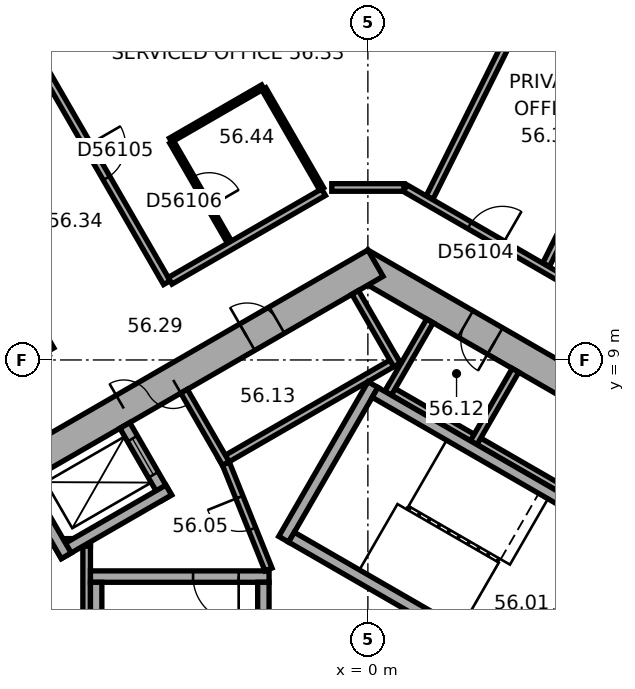
"""IFC4 building model, lengths in metres.
Left out: names, types, materials, properties, quantities, classifications, styles, units other than length and angle.
Written with IfcOpenShell. Run it as: python <this file> out.ifc"""

import sys

from ifc_helpers import new_model, si_unit, direction, frame, frame_2d, origin, place, context, subcontext, project, spatial, rectangle, extrude, element, fill, save


model = new_model("IFC4")
c1 = context("Model", 3, precision=1e-05, world=origin(), true_north=direction((0.0, 1.0)))
c2 = subcontext(c1, "Body", "Model", "MODEL_VIEW")
j1 = project(units=[si_unit("LENGTHUNIT", "METRE"), si_unit("PLANEANGLEUNIT", "RADIAN")], contexts=[c1])
p1 = place(None, origin())
s1 = spatial("IfcSite", under=j1, at=p1, CompositionType="ELEMENT")
p2 = place(p1, origin())
s2 = spatial("IfcBuilding", under=s1, at=p2, CompositionType="ELEMENT")
p3 = place(p2, frame((0.0, 0.0, 229.1)))
s3 = spatial("IfcBuildingStorey", under=s2, at=p3, CompositionType="ELEMENT", Elevation=229.1)
p4 = place(p3, frame((10.1, 5.6, 0.0), z_axis=(0.0, 0.0, 1.0), x_axis=(-0.866023897231, 0.500002609418, 0.0)))
e1 = element("IfcWall", 1, at=p4, inside=s3, PredefinedType="SHEAR", context=c2, shape_type="SweptSolid", body=[
    extrude(rectangle(XDim=11.894, YDim=0.8, at=frame_2d((5.947, 0.0))), origin(), (0.0, 0.0, 1.0), 3.7),
])
p5 = place(p4, frame((3.897, 0.0, 0.0)))
e2 = element("IfcOpeningElement", 2, at=p5, cuts=e1, PredefinedType="OPENING", context=c2, shape_type="SweptSolid", body=[
    extrude(rectangle(XDim=0.9, YDim=2.1, at=frame_2d((0.45, 1.05))), frame((0.0, 0.41, 0.0), z_axis=(0.0, -1.0, 0.0), x_axis=(1.0, 0.0, 0.0)), (0.0, 0.0, 1.0), 0.82),
])
p6 = place(p4, frame((7.797, 0.0, 0.0)))
e3 = element("IfcOpeningElement", 3, at=p6, cuts=e1, PredefinedType="OPENING", context=c2, shape_type="SweptSolid", body=[
    extrude(rectangle(XDim=0.9, YDim=2.1, at=frame_2d((0.45, 1.05))), frame((0.0, 0.41, 0.0), z_axis=(0.0, -1.0, 0.0), x_axis=(1.0, 0.0, 0.0)), (0.0, 0.0, 1.0), 0.82),
])
p7 = place(p3, frame((0.2, 11.547, 0.0), z_axis=(0.0, 0.0, 1.0), x_axis=(-0.866023897231, -0.500002609418, 0.0)))
e4 = element("IfcWall", 4, at=p7, inside=s3, PredefinedType="SHEAR", context=c2, shape_type="SweptSolid", body=[
    extrude(rectangle(XDim=11.894, YDim=0.8, at=frame_2d((5.947, 0.0))), origin(), (0.0, 0.0, 1.0), 3.7),
])
p8 = place(p7, frame((6.147, 0.0, 0.0)))
e5 = element("IfcOpeningElement", 5, at=p8, cuts=e4, PredefinedType="OPENING", context=c2, shape_type="SweptSolid", body=[
    extrude(rectangle(XDim=1.5, YDim=2.1, at=frame_2d((0.75, 1.05))), frame((0.0, 0.41, 0.0), z_axis=(0.0, -1.0, 0.0), x_axis=(1.0, 0.0, 0.0)), (0.0, 0.0, 1.0), 0.82),
])
p9 = place(p7, frame((2.997, 0.0, 0.0)))
e6 = element("IfcOpeningElement", 6, at=p9, cuts=e4, PredefinedType="OPENING", context=c2, shape_type="SweptSolid", body=[
    extrude(rectangle(XDim=0.9, YDim=2.1, at=frame_2d((0.45, 1.05))), frame((0.0, 0.41, 0.0), z_axis=(0.0, -1.0, 0.0), x_axis=(1.0, 0.0, 0.0)), (0.0, 0.0, 1.0), 0.82),
])
p10 = place(p3, frame((18.299, 13.727, 0.0), z_axis=(0.0, 0.0, 1.0), x_axis=(-0.894934554817, 0.44619742558, 0.0)))
e7 = element("IfcWall", 7, at=p10, inside=s3, PredefinedType="STANDARD", context=c2, shape_type="SweptSolid", body=[
    extrude(rectangle(XDim=18.841, YDim=0.2, at=frame_2d((9.421, 0.0))), origin(), (0.0, 0.0, 1.0), 3.7),
])
p11 = place(p10, frame((1.253, 0.0, 0.9)))
e8 = element("IfcOpeningElement", 8, at=p11, cuts=e7, PredefinedType="OPENING", context=c2, shape_type="SweptSolid", body=[
    extrude(rectangle(XDim=2.2, YDim=2.0, at=frame_2d((1.1, 1.0))), frame((0.0, 0.11, 0.0), z_axis=(0.0, -1.0, 0.0), x_axis=(1.0, 0.0, 0.0)), (0.0, 0.0, 1.0), 0.22),
])
p12 = place(p10, frame((4.786, 0.0, 0.9)))
e9 = element("IfcOpeningElement", 9, at=p12, cuts=e7, PredefinedType="OPENING", context=c2, shape_type="SweptSolid", body=[
    extrude(rectangle(XDim=2.2, YDim=2.0, at=frame_2d((1.1, 1.0))), frame((0.0, 0.11, 0.0), z_axis=(0.0, -1.0, 0.0), x_axis=(1.0, 0.0, 0.0)), (0.0, 0.0, 1.0), 0.22),
])
p13 = place(p10, frame((8.32, 0.0, 0.9)))
e10 = element("IfcOpeningElement", 10, at=p13, cuts=e7, PredefinedType="OPENING", context=c2, shape_type="SweptSolid", body=[
    extrude(rectangle(XDim=2.2, YDim=2.0, at=frame_2d((1.1, 1.0))), frame((0.0, 0.11, 0.0), z_axis=(0.0, -1.0, 0.0), x_axis=(1.0, 0.0, 0.0)), (0.0, 0.0, 1.0), 0.22),
])
p14 = place(p10, frame((11.854, 0.0, 0.9)))
e11 = element("IfcOpeningElement", 11, at=p14, cuts=e7, PredefinedType="OPENING", context=c2, shape_type="SweptSolid", body=[
    extrude(rectangle(XDim=2.2, YDim=2.0, at=frame_2d((1.1, 1.0))), frame((0.0, 0.11, 0.0), z_axis=(0.0, -1.0, 0.0), x_axis=(1.0, 0.0, 0.0)), (0.0, 0.0, 1.0), 0.22),
])
p15 = place(p10, frame((15.387, 0.0, 0.9)))
e12 = element("IfcOpeningElement", 12, at=p15, cuts=e7, PredefinedType="OPENING", context=c2, shape_type="SweptSolid", body=[
    extrude(rectangle(XDim=2.2, YDim=2.0, at=frame_2d((1.1, 1.0))), frame((0.0, 0.11, 0.0), z_axis=(0.0, -1.0, 0.0), x_axis=(1.0, 0.0, 0.0)), (0.0, 0.0, 1.0), 0.22),
])
p16 = place(p3, frame((-2.786, 22.005, 0.0), z_axis=(0.0, 0.0, 1.0), x_axis=(-0.866026555358, -0.49999800541, 0.0)))
e13 = element("IfcWall", 13, at=p16, inside=s3, PredefinedType="STANDARD", context=c2, shape_type="SweptSolid", body=[
    extrude(rectangle(XDim=18.841, YDim=0.2, at=frame_2d((9.421, 0.0))), origin(), (0.0, 0.0, 1.0), 3.7),
])
p17 = place(p16, frame((1.254, 0.0, 0.9)))
e14 = element("IfcOpeningElement", 14, at=p17, cuts=e13, PredefinedType="OPENING", context=c2, shape_type="SweptSolid", body=[
    extrude(rectangle(XDim=2.2, YDim=2.0, at=frame_2d((1.1, 1.0))), frame((0.0, 0.11, 0.0), z_axis=(0.0, -1.0, 0.0), x_axis=(1.0, 0.0, 0.0)), (0.0, 0.0, 1.0), 0.22),
])
p18 = place(p16, frame((4.788, 0.0, 0.9)))
e15 = element("IfcOpeningElement", 15, at=p18, cuts=e13, PredefinedType="OPENING", context=c2, shape_type="SweptSolid", body=[
    extrude(rectangle(XDim=2.2, YDim=2.0, at=frame_2d((1.1, 1.0))), frame((0.0, 0.11, 0.0), z_axis=(0.0, -1.0, 0.0), x_axis=(1.0, 0.0, 0.0)), (0.0, 0.0, 1.0), 0.22),
])
p19 = place(p16, frame((8.321, 0.0, 0.9)))
e16 = element("IfcOpeningElement", 16, at=p19, cuts=e13, PredefinedType="OPENING", context=c2, shape_type="SweptSolid", body=[
    extrude(rectangle(XDim=2.2, YDim=2.0, at=frame_2d((1.1, 1.0))), frame((0.0, 0.11, 0.0), z_axis=(0.0, -1.0, 0.0), x_axis=(1.0, 0.0, 0.0)), (0.0, 0.0, 1.0), 0.22),
])
p20 = place(p16, frame((11.855, 0.0, 0.9)))
e17 = element("IfcOpeningElement", 17, at=p20, cuts=e13, PredefinedType="OPENING", context=c2, shape_type="SweptSolid", body=[
    extrude(rectangle(XDim=2.2, YDim=2.0, at=frame_2d((1.1, 1.0))), frame((0.0, 0.11, 0.0), z_axis=(0.0, -1.0, 0.0), x_axis=(1.0, 0.0, 0.0)), (0.0, 0.0, 1.0), 0.22),
])
p21 = place(p16, frame((15.389, 0.0, 0.9)))
e18 = element("IfcOpeningElement", 18, at=p21, cuts=e13, PredefinedType="OPENING", context=c2, shape_type="SweptSolid", body=[
    extrude(rectangle(XDim=2.2, YDim=2.0, at=frame_2d((1.1, 1.0))), frame((0.0, 0.11, 0.0), z_axis=(0.0, -1.0, 0.0), x_axis=(1.0, 0.0, 0.0)), (0.0, 0.0, 1.0), 0.22),
])
p22 = place(p3, frame((7.424, 4.259, 0.0), z_axis=(0.0, 0.0, 1.0), x_axis=(-0.866026010844, 0.49999894854, 0.0)))
e19 = element("IfcWall", 19, at=p22, inside=s3, PredefinedType="PARTITIONING", context=c2, shape_type="SweptSolid", body=[
    extrude(rectangle(XDim=8.0, YDim=0.2, at=frame_2d((4.0, 0.0))), origin(), (0.0, 0.0, 1.0), 3.42),
])
for number, where, z_axis, x_axis in (
    (20, (2.784, 6.822, 0.0), (0.0, 0.0, 1.0), (0.5, 0.866, 0.0)),
    (21, (0.532, 8.122, 0.0), (0.0, 0.0, 1.0), (0.5, 0.866, 0.0)),
):
    element("IfcWall", number, at=place(p3, frame(where, z_axis=z_axis, x_axis=x_axis)), inside=s3, PredefinedType="PARTITIONING", context=c2, shape_type="SweptSolid", body=[
        extrude(rectangle(XDim=2.2, YDim=0.2, at=frame_2d((1.1, 0.0))), origin(), (0.0, 0.0, 1.0), 3.42),
    ])
p23 = place(p3, frame((0.803, 9.009, 0.0), z_axis=(0.0, 0.0, 1.0), x_axis=(-0.866028230842, -0.499995103361, 0.0)))
e22 = element("IfcWall", 22, at=p23, inside=s3, PredefinedType="PARTITIONING", context=c2, shape_type="SweptSolid", body=[
    extrude(rectangle(XDim=5.4, YDim=0.2, at=frame_2d((2.7, 0.0))), origin(), (0.0, 0.0, 1.0), 3.42),
])
p24 = place(p3, frame((0.767, 8.872, 0.0), z_axis=(0.0, 0.0, 1.0), x_axis=(-0.499994660107, 0.866028486751, 0.0)))
e23 = element("IfcWall", 23, at=p24, inside=s3, PredefinedType="PARTITIONING", context=c2, shape_type="SweptSolid", body=[
    extrude(rectangle(XDim=2.2, YDim=0.2, at=frame_2d((1.1, 0.0))), origin(), (0.0, 0.0, 1.0), 3.42),
])
p25 = place(p3, frame((-3.737, 6.272, 0.0), z_axis=(0.0, 0.0, 1.0), x_axis=(-0.50002983664, 0.866008176907, 0.0)))
e24 = element("IfcWall", 24, at=p25, inside=s3, PredefinedType="PARTITIONING", context=c2, shape_type="SweptSolid", body=[
    extrude(rectangle(XDim=2.2, YDim=0.2, at=frame_2d((1.1, 0.0))), origin(), (0.0, 0.0, 1.0), 3.42),
])
p26 = place(p3, frame((-7.4, 4.3, 0.0), z_axis=(0.0, 0.0, 1.0), x_axis=(0.0, -1.0, 0.0)))
e25 = element("IfcWall", 25, at=p26, inside=s3, PredefinedType="PARTITIONING", context=c2, shape_type="SweptSolid", body=[
    extrude(rectangle(XDim=8.0, YDim=0.2, at=frame_2d((4.0, 0.0))), origin(), (0.0, 0.0, 1.0), 3.42),
])
p27 = place(p3, frame((-7.3, 4.2, 0.0), z_axis=(0.0, 0.0, 1.0), x_axis=(-1.0, 0.0, 0.0)))
e26 = element("IfcWall", 26, at=p27, inside=s3, PredefinedType="PARTITIONING", context=c2, shape_type="SweptSolid", body=[
    extrude(rectangle(XDim=2.2, YDim=0.2, at=frame_2d((1.1, 0.0))), origin(), (0.0, 0.0, 1.0), 3.42),
])
p28 = place(p3, frame((4.158, 0.602, 0.0), z_axis=(0.0, 0.0, 1.0), x_axis=(0.499977259774, 0.866038532462, 0.0)))
e27 = element("IfcWall", 27, at=p28, inside=s3, PredefinedType="SHEAR", context=c2, shape_type="SweptSolid", body=[
    extrude(rectangle(XDim=4.7, YDim=0.3, at=frame_2d((2.35, 0.0))), origin(), (0.0, 0.0, 1.0), 3.42),
])
p29 = place(p28, frame((0.8, 0.0, 0.0)))
e28 = element("IfcOpeningElement", 28, at=p29, cuts=e27, PredefinedType="OPENING", context=c2, shape_type="SweptSolid", body=[
    extrude(rectangle(XDim=1.2, YDim=2.1, at=frame_2d((0.6, 1.05))), frame((0.0, 0.16, 0.0), z_axis=(0.0, -1.0, 0.0), x_axis=(1.0, 0.0, 0.0)), (0.0, 0.0, 1.0), 0.32),
])
p30 = place(p3, frame((-2.216, 4.282, 0.0), z_axis=(0.0, 0.0, 1.0), x_axis=(0.499977259774, 0.866038532462, 0.0)))
e29 = element("IfcWall", 29, at=p30, inside=s3, PredefinedType="SHEAR", context=c2, shape_type="SweptSolid", body=[
    extrude(rectangle(XDim=4.7, YDim=0.3, at=frame_2d((2.35, 0.0))), origin(), (0.0, 0.0, 1.0), 3.42),
])
for number, where, z_axis, x_axis in (
    (30, (4.103, 0.807, 0.0), (0.0, 0.0, 1.0), (-0.866, 0.5, 0.0)),
    (31, (6.303, 4.617, 0.0), (0.0, 0.0, 1.0), (-0.866, 0.5, 0.0)),
):
    element("IfcWall", number, at=place(p3, frame(where, z_axis=z_axis, x_axis=x_axis)), inside=s3, PredefinedType="SHEAR", context=c2, shape_type="SweptSolid", body=[
        extrude(rectangle(XDim=7.06, YDim=0.3, at=frame_2d((3.53, 0.0))), origin(), (0.0, 0.0, 1.0), 3.42),
    ])
p31 = place(p3, frame((-2.6, 3.3, 0.0), z_axis=(0.0, 0.0, 1.0), x_axis=(-1.0, 0.0, 0.0)))
e32 = element("IfcWall", 32, at=p31, inside=s3, PredefinedType="SHEAR", context=c2, shape_type="SweptSolid", body=[
    extrude(rectangle(XDim=4.7, YDim=0.3, at=frame_2d((2.35, 0.0))), origin(), (0.0, 0.0, 1.0), 3.42),
])
p32 = place(p31, frame((0.8, 0.0, 0.0)))
e33 = element("IfcOpeningElement", 33, at=p32, cuts=e32, PredefinedType="OPENING", context=c2, shape_type="SweptSolid", body=[
    extrude(rectangle(XDim=1.2, YDim=2.1, at=frame_2d((0.6, 1.05))), frame((0.0, 0.16, 0.0), z_axis=(0.0, -1.0, 0.0), x_axis=(1.0, 0.0, 0.0)), (0.0, 0.0, 1.0), 0.32),
])
for number, where, z_axis, x_axis in (
    (34, (-2.75, 3.15, 0.0), (0.0, 0.0, 1.0), (0.0, -1.0, 0.0)),
    (35, (-7.15, 3.15, 0.0), (0.0, 0.0, 1.0), (0.0, -1.0, 0.0)),
):
    element("IfcWall", number, at=place(p3, frame(where, z_axis=z_axis, x_axis=x_axis)), inside=s3, PredefinedType="SHEAR", context=c2, shape_type="SweptSolid", body=[
        extrude(rectangle(XDim=7.06, YDim=0.3, at=frame_2d((3.53, 0.0))), origin(), (0.0, 0.0, 1.0), 3.42),
    ])
p33 = place(p3, frame((-5.295, 5.372, 0.0), z_axis=(0.0, 0.0, 1.0), x_axis=(-0.500077893725, 0.86598042715, 0.0)))
e36 = element("IfcWall", 36, at=p33, inside=s3, PredefinedType="SHEAR", context=c2, shape_type="SweptSolid", body=[
    extrude(rectangle(XDim=2.2, YDim=0.3, at=frame_2d((1.1, 0.0))), origin(), (0.0, 0.0, 1.0), 3.42),
])
p34 = place(p33, frame((0.7, 0.0, 0.0)))
e37 = element("IfcOpeningElement", 37, at=p34, cuts=e36, PredefinedType="OPENING", context=c2, shape_type="SweptSolid", body=[
    extrude(rectangle(XDim=1.1, YDim=2.1, at=frame_2d((0.55, 1.05))), frame((0.0, 0.16, 0.0), z_axis=(0.0, -1.0, 0.0), x_axis=(1.0, 0.0, 0.0)), (0.0, 0.0, 1.0), 0.32),
])
p35 = place(p3, frame((-5.24, 5.577, 0.0), z_axis=(0.0, 0.0, 1.0), x_axis=(-0.866014461049, -0.500018952895, 0.0)))
e38 = element("IfcWall", 38, at=p35, inside=s3, PredefinedType="SHEAR", context=c2, shape_type="SweptSolid", body=[
    extrude(rectangle(XDim=3.35, YDim=0.3, at=frame_2d((1.675, 0.0))), origin(), (0.0, 0.0, 1.0), 3.42),
])
p36 = place(p3, frame((-7.937, 3.847, 0.0), z_axis=(0.0, 0.0, 1.0), x_axis=(-0.50002983664, 0.866008176907, 0.0)))
e39 = element("IfcWall", 39, at=p36, inside=s3, PredefinedType="SHEAR", context=c2, shape_type="SweptSolid", body=[
    extrude(rectangle(XDim=2.2, YDim=0.3, at=frame_2d((1.1, 0.0))), origin(), (0.0, 0.0, 1.0), 3.42),
])
p37 = place(p3, frame((-2.615, 3.487, 0.0), z_axis=(0.0, 0.0, 1.0), x_axis=(-0.373576831041, 0.92759924068, 0.0)))
e40 = element("IfcWall", 40, at=p37, inside=s3, PredefinedType="PARTITIONING", context=c2, shape_type="SweptSolid", body=[
    extrude(rectangle(XDim=3.002, YDim=0.2, at=frame_2d((1.501, 0.0))), origin(), (0.0, 0.0, 1.0), 3.42),
])
p38 = place(p37, frame((1.15, 0.0, 0.0)))
e41 = element("IfcOpeningElement", 41, at=p38, cuts=e40, PredefinedType="OPENING", context=c2, shape_type="SweptSolid", body=[
    extrude(rectangle(XDim=0.9, YDim=2.1, at=frame_2d((0.45, 1.05))), frame((0.0, 0.11, 0.0), z_axis=(0.0, -1.0, 0.0), x_axis=(1.0, 0.0, 0.0)), (0.0, 0.0, 1.0), 0.22),
])
p39 = place(p3, frame((-12.025, 15.632, 0.0), z_axis=(0.0, 0.0, 1.0), x_axis=(0.499983153418, -0.866035129944, 0.0)))
e42 = element("IfcWall", 42, at=p39, inside=s3, PredefinedType="PARTITIONING", context=c2, shape_type="SweptSolid", body=[
    extrude(rectangle(XDim=7.35, YDim=0.2, at=frame_2d((3.675, 0.0))), origin(), (0.0, 0.0, 1.0), 3.42),
])
p40 = place(p39, frame((3.175, 0.0, 0.0)))
e43 = element("IfcOpeningElement", 43, at=p40, cuts=e42, PredefinedType="OPENING", context=c2, shape_type="SweptSolid", body=[
    extrude(rectangle(XDim=1.0, YDim=2.1, at=frame_2d((0.5, 1.05))), frame((0.0, 0.11, 0.0), z_axis=(0.0, -1.0, 0.0), x_axis=(1.0, 0.0, 0.0)), (0.0, 0.0, 1.0), 0.22),
])
p41 = place(p3, frame((-8.965, 17.399, 0.0), z_axis=(0.0, 0.0, 1.0), x_axis=(0.499993683172, -0.866029050776, 0.0)))
e44 = element("IfcWall", 44, at=p41, inside=s3, PredefinedType="PARTITIONING", context=c2, shape_type="SweptSolid", body=[
    extrude(rectangle(XDim=7.35, YDim=0.2, at=frame_2d((3.675, 0.0))), origin(), (0.0, 0.0, 1.0), 2.87),
])
p42 = place(p41, frame((3.175, 0.0, 0.0)))
e45 = element("IfcOpeningElement", 45, at=p42, cuts=e44, PredefinedType="OPENING", context=c2, shape_type="SweptSolid", body=[
    extrude(rectangle(XDim=1.0, YDim=2.1, at=frame_2d((0.5, 1.05))), frame((0.0, 0.11, 0.0), z_axis=(0.0, -1.0, 0.0), x_axis=(1.0, 0.0, 0.0)), (0.0, 0.0, 1.0), 0.22),
])
p43 = place(p3, frame((-5.191, 14.785, 0.0), z_axis=(0.0, 0.0, 1.0), x_axis=(0.866034573852, 0.49998411664, 0.0)))
e46 = element("IfcWall", 46, at=p43, inside=s3, PredefinedType="PARTITIONING", context=c2, shape_type="SweptSolid", body=[
    extrude(rectangle(XDim=2.8, YDim=0.12, at=frame_2d((1.4, 0.0))), origin(), (0.0, 0.0, 1.0), 3.42),
])
p44 = place(p3, frame((-3.641, 12.101, 0.0), z_axis=(0.0, 0.0, 1.0), x_axis=(-0.500026023896, 0.86601037836, 0.0)))
e47 = element("IfcWall", 47, at=p44, inside=s3, PredefinedType="PARTITIONING", context=c2, shape_type="SweptSolid", body=[
    extrude(rectangle(XDim=3.04, YDim=0.12, at=frame_2d((1.52, 0.0))), origin(), (0.0, 0.0, 1.0), 3.42),
])
p45 = place(p44, frame((1.07, 0.0, 0.0)))
e48 = element("IfcOpeningElement", 48, at=p45, cuts=e47, PredefinedType="OPENING", context=c2, shape_type="SweptSolid", body=[
    extrude(rectangle(XDim=0.9, YDim=2.1, at=frame_2d((0.45, 1.05))), frame((0.0, 0.07, 0.0), z_axis=(0.0, -1.0, 0.0), x_axis=(1.0, 0.0, 0.0)), (0.0, 0.0, 1.0), 0.14),
])
p46 = place(p3, frame((-2.737, 16.133, 0.0), z_axis=(0.0, 0.0, 1.0), x_axis=(0.500026023896, -0.86601037836, 0.0)))
e49 = element("IfcWall", 49, at=p46, inside=s3, PredefinedType="PARTITIONING", context=c2, shape_type="SweptSolid", body=[
    extrude(rectangle(XDim=3.04, YDim=0.12, at=frame_2d((1.52, 0.0))), origin(), (0.0, 0.0, 1.0), 3.42),
])
p47 = place(p3, frame((-1.167, 13.414, 0.0), z_axis=(0.0, 0.0, 1.0), x_axis=(-0.866023347809, -0.500003561037, 0.0)))
e50 = element("IfcWall", 50, at=p47, inside=s3, PredefinedType="PARTITIONING", context=c2, shape_type="SweptSolid", body=[
    extrude(rectangle(XDim=4.661, YDim=0.2, at=frame_2d((2.331, 0.0))), origin(), (0.0, 0.0, 1.0), 3.42),
])
p48 = place(p3, frame((0.95, 13.539, 0.0), z_axis=(0.0, 0.0, 1.0), x_axis=(-1.0, 0.0, 0.0)))
e51 = element("IfcWall", 51, at=p48, inside=s3, PredefinedType="PARTITIONING", context=c2, shape_type="SweptSolid", body=[
    extrude(rectangle(XDim=1.9, YDim=0.2, at=frame_2d((0.95, 0.0))), origin(), (0.0, 0.0, 1.0), 3.42),
])
p49 = place(p3, frame((4.723, 19.49, 0.0), z_axis=(0.0, 0.0, 1.0), x_axis=(-0.446186614574, -0.894939944898, 0.0)))
e52 = element("IfcWall", 52, at=p49, inside=s3, PredefinedType="PARTITIONING", context=c2, shape_type="SweptSolid", body=[
    extrude(rectangle(XDim=6.944, YDim=0.2, at=frame_2d((3.472, 0.0))), origin(), (0.0, 0.0, 1.0), 2.87),
])
p50 = place(p3, frame((7.886, 17.913, 0.0), z_axis=(0.0, 0.0, 1.0), x_axis=(-0.446204015428, -0.894931269213, 0.0)))
e53 = element("IfcWall", 53, at=p50, inside=s3, PredefinedType="PARTITIONING", context=c2, shape_type="SweptSolid", body=[
    extrude(rectangle(XDim=7.16, YDim=0.2, at=frame_2d((3.58, 0.0))), origin(), (0.0, 0.0, 1.0), 3.42),
])
p51 = place(p3, frame((8.505, 9.177, 0.0), z_axis=(0.0, 0.0, 1.0), x_axis=(-0.866019839902, 0.500009636803, 0.0)))
e54 = element("IfcWall", 54, at=p51, inside=s3, PredefinedType="PARTITIONING", context=c2, shape_type="SweptSolid", body=[
    extrude(rectangle(XDim=8.683, YDim=0.2, at=frame_2d((4.342, 0.0))), origin(), (0.0, 0.0, 1.0), 3.42),
])
p52 = place(p51, frame((5.73, 0.0, 0.0)))
e55 = element("IfcOpeningElement", 55, at=p52, cuts=e54, PredefinedType="OPENING", context=c2, shape_type="SweptSolid", body=[
    extrude(rectangle(XDim=1.0, YDim=2.1, at=frame_2d((0.5, 1.05))), frame((0.0, 0.11, 0.0), z_axis=(0.0, -1.0, 0.0), x_axis=(1.0, 0.0, 0.0)), (0.0, 0.0, 1.0), 0.22),
])
p53 = place(p8, origin())
e56 = element("IfcDoor", 56, at=p53, inside=s3, OperationType="DOUBLE_DOOR_SINGLE_SWING", PredefinedType="DOOR", context=c2, shape_type="SweptSolid", body=[
    extrude(rectangle(XDim=1.5, YDim=2.1, at=frame_2d((0.75, 1.05))), frame((0.0, 0.025, 0.0), z_axis=(0.0, -1.0, 0.0), x_axis=(1.0, 0.0, 0.0)), (0.0, 0.0, 1.0), 0.05),
])
fill(e5, e56)
p54 = place(p32, origin())
e57 = element("IfcDoor", 57, at=p54, inside=s3, OperationType="SINGLE_SWING_RIGHT", PredefinedType="DOOR", context=c2, shape_type="SweptSolid", body=[
    extrude(rectangle(XDim=1.2, YDim=2.1, at=frame_2d((0.6, 1.05))), frame((0.0, 0.025, 0.0), z_axis=(0.0, -1.0, 0.0), x_axis=(1.0, 0.0, 0.0)), (0.0, 0.0, 1.0), 0.05),
])
fill(e33, e57)
p55 = place(p38, origin())
e58 = element("IfcDoor", 58, at=p55, inside=s3, OperationType="SINGLE_SWING_LEFT", PredefinedType="DOOR", context=c2, shape_type="SweptSolid", body=[
    extrude(rectangle(XDim=0.9, YDim=2.1, at=frame_2d((0.45, 1.05))), frame((0.0, 0.025, 0.0), z_axis=(0.0, -1.0, 0.0), x_axis=(1.0, 0.0, 0.0)), (0.0, 0.0, 1.0), 0.05),
])
fill(e41, e58)
p56 = place(p6, origin())
e59 = element("IfcDoor", 59, at=p56, inside=s3, OperationType="SINGLE_SWING_LEFT", PredefinedType="DOOR", context=c2, shape_type="SweptSolid", body=[
    extrude(rectangle(XDim=0.9, YDim=2.1, at=frame_2d((0.45, 1.05))), frame((0.0, 0.025, 0.0), z_axis=(0.0, -1.0, 0.0), x_axis=(1.0, 0.0, 0.0)), (0.0, 0.0, 1.0), 0.05),
])
fill(e3, e59)
p57 = place(p9, origin())
e60 = element("IfcDoor", 60, at=p57, inside=s3, OperationType="SINGLE_SWING_LEFT", PredefinedType="DOOR", context=c2, shape_type="SweptSolid", body=[
    extrude(rectangle(XDim=0.9, YDim=2.1, at=frame_2d((0.45, 1.05))), frame((0.0, 0.025, 0.0), z_axis=(0.0, -1.0, 0.0), x_axis=(1.0, 0.0, 0.0)), (0.0, 0.0, 1.0), 0.05),
])
fill(e6, e60)
p58 = place(p34, origin())
e61 = element("IfcDoor", 61, at=p58, inside=s3, OperationType="DOUBLE_DOOR_SLIDING", PredefinedType="DOOR", context=c2, shape_type="SweptSolid", body=[
    extrude(rectangle(XDim=1.1, YDim=2.1, at=frame_2d((0.55, 1.05))), frame((0.0, 0.025, 0.0), z_axis=(0.0, -1.0, 0.0), x_axis=(1.0, 0.0, 0.0)), (0.0, 0.0, 1.0), 0.05),
])
fill(e37, e61)
p59 = place(p52, origin())
e62 = element("IfcDoor", 62, at=p59, inside=s3, OperationType="SINGLE_SWING_LEFT", PredefinedType="DOOR", context=c2, shape_type="SweptSolid", body=[
    extrude(rectangle(XDim=1.0, YDim=2.1, at=frame_2d((0.5, 1.05))), frame((0.0, 0.025, 0.0), z_axis=(0.0, -1.0, 0.0), x_axis=(1.0, 0.0, 0.0)), (0.0, 0.0, 1.0), 0.05),
])
fill(e55, e62)
p60 = place(p42, origin())
e63 = element("IfcDoor", 63, at=p60, inside=s3, OperationType="SINGLE_SWING_LEFT", PredefinedType="DOOR", context=c2, shape_type="SweptSolid", body=[
    extrude(rectangle(XDim=1.0, YDim=2.1, at=frame_2d((0.5, 1.05))), frame((0.0, 0.025, 0.0), z_axis=(0.0, -1.0, 0.0), x_axis=(1.0, 0.0, 0.0)), (0.0, 0.0, 1.0), 0.05),
])
fill(e45, e63)
p61 = place(p45, origin())
e64 = element("IfcDoor", 64, at=p61, inside=s3, OperationType="SINGLE_SWING_LEFT", PredefinedType="DOOR", context=c2, shape_type="SweptSolid", body=[
    extrude(rectangle(XDim=0.9, YDim=2.1, at=frame_2d((0.45, 1.05))), frame((0.0, 0.025, 0.0), z_axis=(0.0, -1.0, 0.0), x_axis=(1.0, 0.0, 0.0)), (0.0, 0.0, 1.0), 0.05),
])
fill(e48, e64)
save(model, sys.argv[1])
